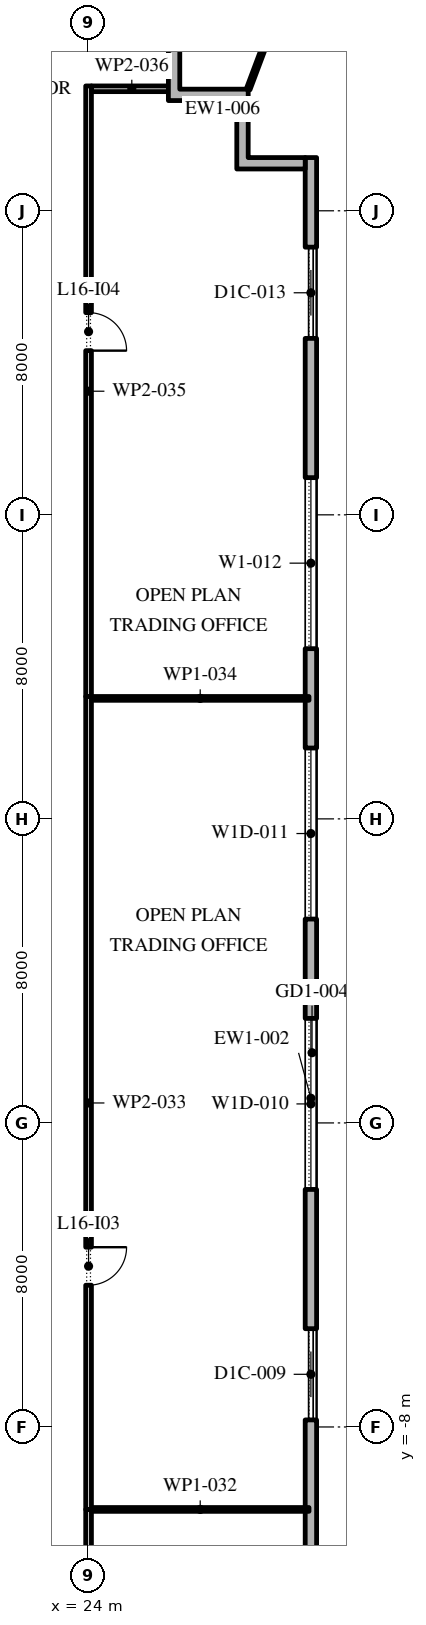
"""IFC4 building model, lengths in metres.
Left out: names, types, materials, properties, quantities, classifications, styles, units other than length and angle.
Written with IfcOpenShell. Run it as: python <this file> out.ifc"""

import sys

from ifc_helpers import new_model, si_unit, direction, frame, frame_2d, origin, place, context, subcontext, project, spatial, polyline, rectangle, outline, extrude, element, fill, save


model = new_model("IFC4")
c1 = context("Model", 3, precision=1e-05, world=origin(), true_north=direction((0.0, 1.0)))
c2 = subcontext(c1, "Body", "Model", "MODEL_VIEW")
j1 = project(units=[si_unit("LENGTHUNIT", "METRE"), si_unit("PLANEANGLEUNIT", "RADIAN")], contexts=[c1])
p1 = place(None, origin())
s1 = spatial("IfcSite", under=j1, at=p1, CompositionType="ELEMENT")
p2 = place(p1, origin())
s2 = spatial("IfcBuilding", under=s1, at=p2, CompositionType="ELEMENT")
p3 = place(p2, frame((0.0, 0.0, 77.4)))
s3 = spatial("IfcBuildingStorey", under=s2, at=p3, CompositionType="ELEMENT", Elevation=77.4)
p4 = place(p3, frame((29.85, -24.1, 0.0), z_axis=(0.0, 0.0, 1.0), x_axis=(0.0, 1.0, 0.0)))
e1 = element("IfcWall", 1, at=p4, inside=s3, PredefinedType="STANDARD", context=c2, shape_type="SweptSolid", body=[
    extrude(rectangle(XDim=49.5, YDim=0.3, at=frame_2d((24.75, 0.0))), origin(), (0.0, 0.0, 1.0), 4.0),
])
p5 = place(p4, frame((1.157, 0.0, 0.45)))
e2 = element("IfcOpeningElement", 2, at=p5, cuts=e1, PredefinedType="OPENING", context=c2, shape_type="SweptSolid", body=[
    extrude(rectangle(XDim=4.5, YDim=3.05, at=frame_2d((2.25, 1.525))), frame((0.0, 0.16, 0.0), z_axis=(0.0, -1.0, 0.0), x_axis=(1.0, 0.0, 0.0)), (0.0, 0.0, 1.0), 0.32),
])
p6 = place(p4, frame((8.121, 0.0, 0.45)))
e3 = element("IfcOpeningElement", 3, at=p6, cuts=e1, PredefinedType="OPENING", context=c2, shape_type="SweptSolid", body=[
    extrude(rectangle(XDim=4.5, YDim=2.825, at=frame_2d((2.25, 1.413))), frame((0.0, 0.16, 0.0), z_axis=(0.0, -1.0, 0.0), x_axis=(1.0, 0.0, 0.0)), (0.0, 0.0, 1.0), 0.32),
])
p7 = place(p4, frame((16.286, 0.0, 0.0)))
e4 = element("IfcOpeningElement", 4, at=p7, cuts=e1, PredefinedType="OPENING", context=c2, shape_type="SweptSolid", body=[
    extrude(rectangle(XDim=2.4, YDim=3.325, at=frame_2d((1.2, 1.663))), frame((0.0, 0.16, 0.0), z_axis=(0.0, -1.0, 0.0), x_axis=(1.0, 0.0, 0.0)), (0.0, 0.0, 1.0), 0.32),
])
p8 = place(p4, frame((22.35, 0.0, 0.45)))
e5 = element("IfcOpeningElement", 5, at=p8, cuts=e1, PredefinedType="OPENING", context=c2, shape_type="SweptSolid", body=[
    extrude(rectangle(XDim=4.5, YDim=2.875, at=frame_2d((2.25, 1.438))), frame((0.0, 0.16, 0.0), z_axis=(0.0, -1.0, 0.0), x_axis=(1.0, 0.0, 0.0)), (0.0, 0.0, 1.0), 0.32),
])
p9 = place(p4, frame((29.464, 0.0, 0.45)))
e6 = element("IfcOpeningElement", 6, at=p9, cuts=e1, PredefinedType="OPENING", context=c2, shape_type="SweptSolid", body=[
    extrude(rectangle(XDim=4.5, YDim=2.875, at=frame_2d((2.25, 1.438))), frame((0.0, 0.16, 0.0), z_axis=(0.0, -1.0, 0.0), x_axis=(1.0, 0.0, 0.0)), (0.0, 0.0, 1.0), 0.32),
])
p10 = place(p4, frame((36.579, 0.0, 0.45)))
e7 = element("IfcOpeningElement", 7, at=p10, cuts=e1, PredefinedType="OPENING", context=c2, shape_type="SweptSolid", body=[
    extrude(rectangle(XDim=4.5, YDim=3.05, at=frame_2d((2.25, 1.525))), frame((0.0, 0.16, 0.0), z_axis=(0.0, -1.0, 0.0), x_axis=(1.0, 0.0, 0.0)), (0.0, 0.0, 1.0), 0.32),
])
p11 = place(p4, frame((44.743, 0.0, 0.0)))
e8 = element("IfcOpeningElement", 8, at=p11, cuts=e1, PredefinedType="OPENING", context=c2, shape_type="SweptSolid", body=[
    extrude(rectangle(XDim=2.4, YDim=3.325, at=frame_2d((1.2, 1.663))), frame((0.0, 0.16, 0.0), z_axis=(0.0, -1.0, 0.0), x_axis=(1.0, 0.0, 0.0)), (0.0, 0.0, 1.0), 0.32),
])
p12 = place(p3, origin())
e9 = element("IfcWall", 9, at=p12, inside=s3, PredefinedType="STANDARD", context=c2, shape_type="SweptSolid", body=[
    extrude(outline(polyline([(27.9, 26.9), (26.1, 26.9), (26.1, 29.0), (26.4, 29.0), (26.4, 27.2), (28.2, 27.2), (28.2, 25.4), (29.7, 25.4), (29.7, 25.1), (27.9, 25.1), (27.9, 26.9)])), origin(), (0.0, 0.0, 1.0), 4.0),
])
p13 = place(p3, frame((28.2, 27.2, -0.05), z_axis=(0.0, 0.0, 1.0), x_axis=(0.351989298561, 0.936004024403, 0.0)))
e10 = element("IfcWall", 10, at=p13, inside=s3, PredefinedType="STANDARD", context=c2, shape_type="SweptSolid", body=[
    extrude(rectangle(XDim=5.808, YDim=0.1, at=frame_2d((2.904, 0.0))), origin(), (0.0, 0.0, 1.0), 4.05),
])
p14 = place(p3, frame((24.0, -10.17, 0.0), z_axis=(0.0, 0.0, 1.0), x_axis=(0.0, -1.0, 0.0)))
e11 = element("IfcWall", 11, at=p14, inside=s3, PredefinedType="PARTITIONING", context=c2, shape_type="SweptSolid", body=[
    extrude(rectangle(XDim=7.755, YDim=0.15, at=frame_2d((3.877, 0.0))), origin(), (0.0, 0.0, 1.0), 4.0),
])
p15 = place(p3, frame((24.075, -10.17, 0.0), z_axis=(0.0, 0.0, 1.0), x_axis=(1.0, 0.0, 0.0)))
e12 = element("IfcWall", 12, at=p15, inside=s3, PredefinedType="PARTITIONING", context=c2, shape_type="SweptSolid", body=[
    extrude(rectangle(XDim=5.725, YDim=0.1, at=frame_2d((2.863, 0.0))), origin(), (0.0, 0.0, 1.0), 4.0),
])
p16 = place(p3, frame((24.0, 11.22, 0.0), z_axis=(0.0, 0.0, 1.0), x_axis=(0.0, -1.0, 0.0)))
e13 = element("IfcWall", 13, at=p16, inside=s3, PredefinedType="PARTITIONING", context=c2, shape_type="SweptSolid", body=[
    extrude(rectangle(XDim=21.39, YDim=0.15, at=frame_2d((10.695, 0.0))), origin(), (0.0, 0.0, 1.0), 4.0),
])
p17 = place(p16, frame((14.49, 0.0, 0.0)))
e14 = element("IfcOpeningElement", 14, at=p17, cuts=e13, PredefinedType="OPENING", context=c2, shape_type="SweptSolid", body=[
    extrude(rectangle(XDim=1.0, YDim=2.1, at=frame_2d((0.5, 1.05))), frame((0.0, 0.085, 0.0), z_axis=(0.0, -1.0, 0.0), x_axis=(1.0, 0.0, 0.0)), (0.0, 0.0, 1.0), 0.17),
])
p18 = place(p3, frame((24.075, 11.17, 0.0), z_axis=(0.0, 0.0, 1.0), x_axis=(1.0, 0.0, 0.0)))
e15 = element("IfcWall", 15, at=p18, inside=s3, PredefinedType="PARTITIONING", context=c2, shape_type="SweptSolid", body=[
    extrude(rectangle(XDim=5.725, YDim=0.1, at=frame_2d((2.863, 0.0))), origin(), (0.0, 0.0, 1.0), 4.0),
])
p19 = place(p3, frame((24.0, 27.285, 0.0), z_axis=(0.0, 0.0, 1.0), x_axis=(0.0, -1.0, 0.0)))
e16 = element("IfcWall", 16, at=p19, inside=s3, PredefinedType="PARTITIONING", context=c2, shape_type="SweptSolid", body=[
    extrude(rectangle(XDim=16.065, YDim=0.15, at=frame_2d((8.032, 0.0))), origin(), (0.0, 0.0, 1.0), 4.0),
])
p20 = place(p19, frame((5.965, 0.0, 0.0)))
e17 = element("IfcOpeningElement", 17, at=p20, cuts=e16, PredefinedType="OPENING", context=c2, shape_type="SweptSolid", body=[
    extrude(rectangle(XDim=1.0, YDim=2.1, at=frame_2d((0.5, 1.05))), frame((0.0, 0.085, 0.0), z_axis=(0.0, -1.0, 0.0), x_axis=(1.0, 0.0, 0.0)), (0.0, 0.0, 1.0), 0.17),
])
p21 = place(p3, frame((26.2, 27.21, 0.0), z_axis=(0.0, 0.0, 1.0), x_axis=(-1.0, 0.0, 0.0)))
e18 = element("IfcWall", 18, at=p21, inside=s3, PredefinedType="PARTITIONING", context=c2, shape_type="SweptSolid", body=[
    extrude(rectangle(XDim=2.125, YDim=0.15, at=frame_2d((1.062, 0.0))), origin(), (0.0, 0.0, 1.0), 4.0),
])
p22 = place(p7, origin())
e19 = element("IfcDoor", 19, at=p22, inside=s3, OperationType="DOUBLE_DOOR_SLIDING", PredefinedType="DOOR", context=c2, shape_type="SweptSolid", body=[
    extrude(rectangle(XDim=2.4, YDim=3.325, at=frame_2d((1.2, 1.663))), frame((0.0, 0.025, 0.0), z_axis=(0.0, -1.0, 0.0), x_axis=(1.0, 0.0, 0.0)), (0.0, 0.0, 1.0), 0.05),
])
fill(e4, e19)
p23 = place(p8, origin())
e20 = element("IfcWindow", 20, at=p23, inside=s3, PartitioningType="DOUBLE_PANEL_VERTICAL", PredefinedType="WINDOW", context=c2, shape_type="SweptSolid", body=[
    extrude(rectangle(XDim=4.5, YDim=2.875, at=frame_2d((2.25, 1.438))), frame((0.0, 0.03, 0.0), z_axis=(0.0, -1.0, 0.0), x_axis=(1.0, 0.0, 0.0)), (0.0, 0.0, 1.0), 0.06),
])
fill(e5, e20)
p24 = place(p9, origin())
e21 = element("IfcWindow", 21, at=p24, inside=s3, PartitioningType="DOUBLE_PANEL_VERTICAL", PredefinedType="WINDOW", context=c2, shape_type="SweptSolid", body=[
    extrude(rectangle(XDim=4.5, YDim=2.875, at=frame_2d((2.25, 1.438))), frame((0.0, 0.03, 0.0), z_axis=(0.0, -1.0, 0.0), x_axis=(1.0, 0.0, 0.0)), (0.0, 0.0, 1.0), 0.06),
])
fill(e6, e21)
p25 = place(p10, origin())
e22 = element("IfcWindow", 22, at=p25, inside=s3, PartitioningType="DOUBLE_PANEL_VERTICAL", PredefinedType="WINDOW", context=c2, shape_type="SweptSolid", body=[
    extrude(rectangle(XDim=4.5, YDim=3.05, at=frame_2d((2.25, 1.525))), frame((0.0, 0.03, 0.0), z_axis=(0.0, -1.0, 0.0), x_axis=(1.0, 0.0, 0.0)), (0.0, 0.0, 1.0), 0.06),
])
fill(e7, e22)
p26 = place(p11, origin())
e23 = element("IfcDoor", 23, at=p26, inside=s3, OperationType="DOUBLE_DOOR_SLIDING", PredefinedType="DOOR", context=c2, shape_type="SweptSolid", body=[
    extrude(rectangle(XDim=2.4, YDim=3.325, at=frame_2d((1.2, 1.663))), frame((0.0, 0.025, 0.0), z_axis=(0.0, -1.0, 0.0), x_axis=(1.0, 0.0, 0.0)), (0.0, 0.0, 1.0), 0.05),
])
fill(e8, e23)
p27 = place(p17, origin())
e24 = element("IfcDoor", 24, at=p27, inside=s3, OperationType="SINGLE_SWING_RIGHT", PredefinedType="DOOR", context=c2, shape_type="SweptSolid", body=[
    extrude(rectangle(XDim=1.0, YDim=2.1, at=frame_2d((0.5, 1.05))), frame((0.0, 0.025, 0.0), z_axis=(0.0, -1.0, 0.0), x_axis=(1.0, 0.0, 0.0)), (0.0, 0.0, 1.0), 0.05),
])
fill(e14, e24)
p28 = place(p20, origin())
e25 = element("IfcDoor", 25, at=p28, inside=s3, OperationType="SINGLE_SWING_LEFT", PredefinedType="DOOR", context=c2, shape_type="SweptSolid", body=[
    extrude(rectangle(XDim=1.0, YDim=2.1, at=frame_2d((0.5, 1.05))), frame((0.0, 0.025, 0.0), z_axis=(0.0, -1.0, 0.0), x_axis=(1.0, 0.0, 0.0)), (0.0, 0.0, 1.0), 0.05),
])
fill(e17, e25)
save(model, sys.argv[1])
